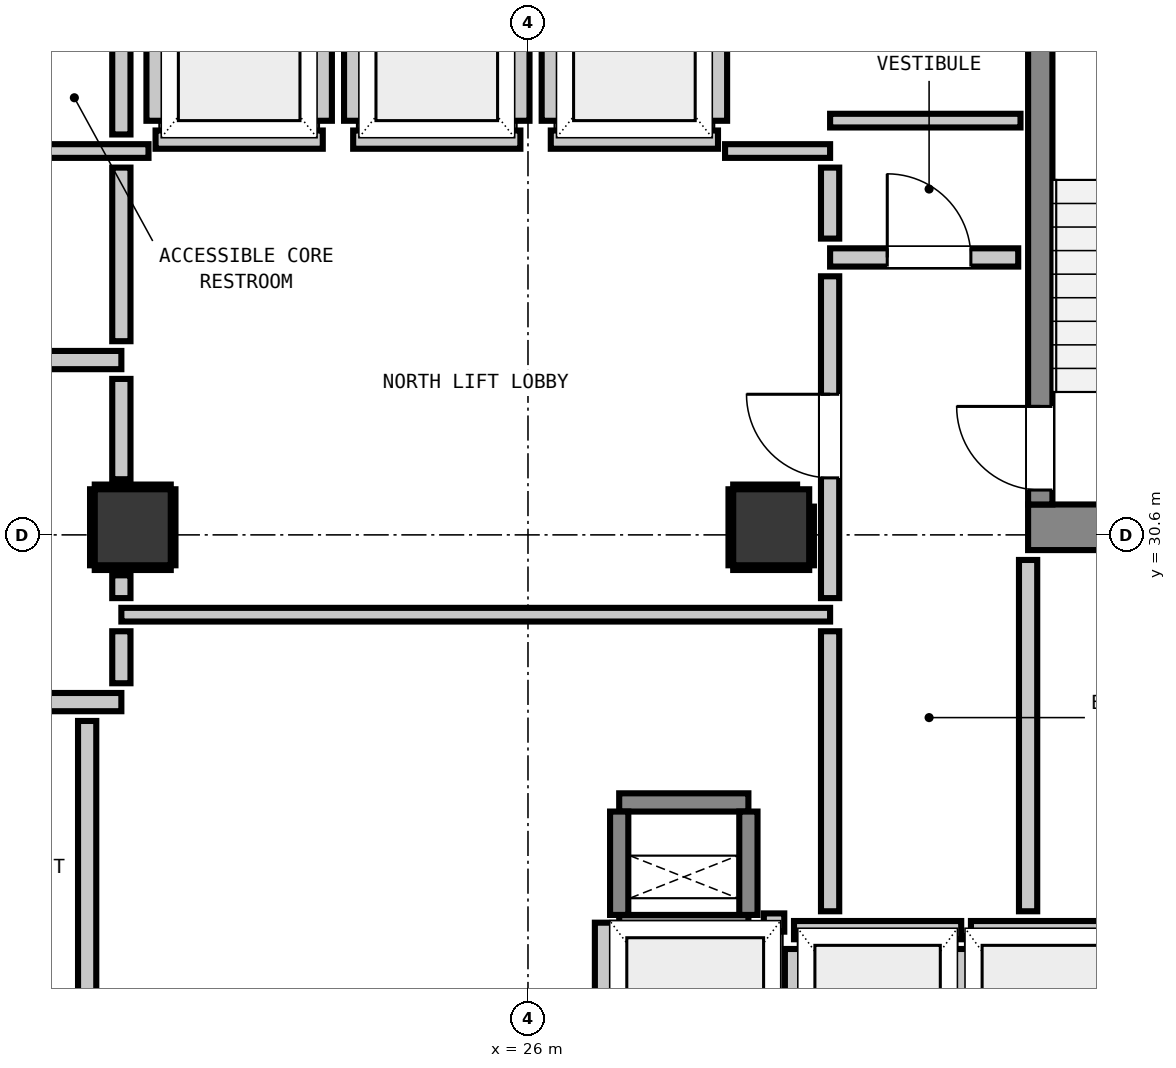
"""IFC4 building model, lengths in metres.
Left out: names, types, materials, properties, quantities, classifications, styles, units other than length and angle.
Written with IfcOpenShell. Run it as: python <this file> out.ifc"""

import sys

from ifc_helpers import new_model, si_unit, direction, frame, frame_2d, origin, origin_2d, place, context, subcontext, project, spatial, rectangle, extrude, element, fill, save


model = new_model("IFC4")
c1 = context("Model", 3, precision=1e-05, world=origin(), true_north=direction((0.0, 1.0)))
c2 = subcontext(c1, "Body", "Model", "MODEL_VIEW")
j1 = project(units=[si_unit("LENGTHUNIT", "METRE"), si_unit("PLANEANGLEUNIT", "RADIAN")], contexts=[c1])
p1 = place(None, origin())
s1 = spatial("IfcSite", under=j1, at=p1, CompositionType="ELEMENT")
p2 = place(p1, origin())
s2 = spatial("IfcBuilding", under=s1, at=p2, CompositionType="ELEMENT")
p3 = place(p2, frame((0.0, 0.0, 41.92)))
s3 = spatial("IfcBuildingStorey", under=s2, at=p3, CompositionType="ELEMENT", Elevation=41.92)
p4 = place(p3, frame((32.58, 30.7, 0.0), z_axis=(0.0, 0.0, 1.0), x_axis=(1.0, 0.0, 0.0)))
e1 = element("IfcWall", 1, at=p4, inside=s3, PredefinedType="SHEAR", context=c2, shape_type="SweptSolid", body=[
    extrude(rectangle(XDim=3.415, YDim=0.6, at=frame_2d((1.708, 0.0))), origin(), (0.0, 0.0, 1.0), 3.32),
])
p5 = place(p3, frame((32.74, 31.0, 0.0), z_axis=(0.0, 0.0, 1.0), x_axis=(0.0, 1.0, 0.0)))
e2 = element("IfcWall", 2, at=p5, inside=s3, PredefinedType="SHEAR", context=c2, shape_type="SweptSolid", body=[
    extrude(rectangle(XDim=7.8, YDim=0.32, at=frame_2d((3.9, 0.0))), origin(), (0.0, 0.0, 1.0), 3.32),
])
p6 = place(p5, frame((0.19, 0.0, 0.0)))
e3 = element("IfcOpeningElement", 3, at=p6, cuts=e2, PredefinedType="OPENING", context=c2, shape_type="SweptSolid", body=[
    extrude(rectangle(XDim=1.1, YDim=2.15, at=frame_2d((0.55, 1.075))), frame((0.0, 0.17, 0.0), z_axis=(0.0, -1.0, 0.0), x_axis=(1.0, 0.0, 0.0)), (0.0, 0.0, 1.0), 0.34),
])
for number, where, z_axis, x_axis in (
    (4, (27.2, 25.48, 0.0), (0.0, 0.0, 1.0), (1.0, 0.0, 0.0)),
    (5, (27.2, 27.08, 0.0), (0.0, 0.0, 1.0), (1.0, 0.0, 0.0)),
):
    element("IfcWall", number, at=place(p3, frame(where, z_axis=z_axis, x_axis=x_axis)), inside=s3, PredefinedType="SHEAR", context=c2, shape_type="SweptSolid", body=[
        extrude(rectangle(XDim=1.7, YDim=0.24, at=frame_2d((0.85, 0.0))), origin(), (0.0, 0.0, 1.0), 3.32),
    ])
for number, where, z_axis, x_axis in (
    (6, (27.2, 25.6, 0.0), (0.0, 0.0, 1.0), (0.0, 1.0, 0.0)),
    (7, (28.9, 25.6, 0.0), (0.0, 0.0, 1.0), (0.0, 1.0, 0.0)),
):
    element("IfcWall", number, at=place(p3, frame(where, z_axis=z_axis, x_axis=x_axis)), inside=s3, PredefinedType="SHEAR", context=c2, shape_type="SweptSolid", body=[
        extrude(rectangle(XDim=1.36, YDim=0.24, at=frame_2d((0.68, 0.0))), origin(), (0.0, 0.0, 1.0), 3.32),
    ])
for number, where, z_axis, x_axis in (
    (8, (20.8, 30.7, 0.0), (0.0, 0.0, 1.0), (1.0, 0.0, 0.0)),
    (9, (29.2, 30.7, 0.0), (0.0, 0.0, 1.0), (1.0, 0.0, 0.0)),
):
    element("IfcColumn", number, at=place(p3, frame(where, z_axis=z_axis, x_axis=x_axis)), inside=s3, PredefinedType="COLUMN", context=c2, shape_type="SweptSolid", body=[
        extrude(rectangle(XDim=1.0, YDim=1.0, at=origin_2d()), origin(), (0.0, 0.0, 1.0), 3.32),
    ])
p7 = place(p3, frame((21.1, 35.8, 0.0), z_axis=(0.0, 0.0, 1.0), x_axis=(1.0, 0.0, 0.0)))
e10 = element("IfcWall", 10, at=p7, inside=s3, PredefinedType="PARTITIONING", context=c2, shape_type="SweptSolid", body=[
    extrude(rectangle(XDim=2.2, YDim=0.24, at=frame_2d((1.1, 0.0))), origin(), (0.0, 0.0, 1.0), 3.06),
])
p8 = place(p3, frame((21.1, 36.048, 0.0), z_axis=(0.0, 0.0, 1.0), x_axis=(0.0, 1.0, 0.0)))
e11 = element("IfcWall", 11, at=p8, inside=s3, PredefinedType="PARTITIONING", context=c2, shape_type="SweptSolid", body=[
    extrude(rectangle(XDim=2.104, YDim=0.24, at=frame_2d((1.052, 0.0))), origin(), (0.0, 0.0, 1.0), 2.295),
])
p9 = place(p3, frame((23.3, 36.048, 0.0), z_axis=(0.0, 0.0, 1.0), x_axis=(0.0, 1.0, 0.0)))
e12 = element("IfcWall", 12, at=p9, inside=s3, PredefinedType="PARTITIONING", context=c2, shape_type="SweptSolid", body=[
    extrude(rectangle(XDim=2.104, YDim=0.24, at=frame_2d((1.052, 0.0))), origin(), (0.0, 0.0, 1.0), 3.06),
])
p10 = place(p3, frame((23.7, 35.8, 0.0), z_axis=(0.0, 0.0, 1.0), x_axis=(1.0, 0.0, 0.0)))
e13 = element("IfcWall", 13, at=p10, inside=s3, PredefinedType="PARTITIONING", context=c2, shape_type="SweptSolid", body=[
    extrude(rectangle(XDim=2.2, YDim=0.24, at=frame_2d((1.1, 0.0))), origin(), (0.0, 0.0, 1.0), 3.06),
])
for number, where, z_axis, x_axis in (
    (14, (23.7, 36.048, 0.0), (0.0, 0.0, 1.0), (0.0, 1.0, 0.0)),
    (15, (25.9, 36.048, 0.0), (0.0, 0.0, 1.0), (0.0, 1.0, 0.0)),
):
    element("IfcWall", number, at=place(p3, frame(where, z_axis=z_axis, x_axis=x_axis)), inside=s3, PredefinedType="PARTITIONING", context=c2, shape_type="SweptSolid", body=[
        extrude(rectangle(XDim=2.104, YDim=0.24, at=frame_2d((1.052, 0.0))), origin(), (0.0, 0.0, 1.0), 3.06),
    ])
p11 = place(p3, frame((26.3, 35.8, 0.0), z_axis=(0.0, 0.0, 1.0), x_axis=(1.0, 0.0, 0.0)))
e16 = element("IfcWall", 16, at=p11, inside=s3, PredefinedType="PARTITIONING", context=c2, shape_type="SweptSolid", body=[
    extrude(rectangle(XDim=2.2, YDim=0.24, at=frame_2d((1.1, 0.0))), origin(), (0.0, 0.0, 1.0), 3.06),
])
for number, where, z_axis, x_axis in (
    (17, (26.3, 36.048, 0.0), (0.0, 0.0, 1.0), (0.0, 1.0, 0.0)),
    (18, (28.5, 36.048, 0.0), (0.0, 0.0, 1.0), (0.0, 1.0, 0.0)),
):
    element("IfcWall", number, at=place(p3, frame(where, z_axis=z_axis, x_axis=x_axis)), inside=s3, PredefinedType="PARTITIONING", context=c2, shape_type="SweptSolid", body=[
        extrude(rectangle(XDim=2.104, YDim=0.24, at=frame_2d((1.052, 0.0))), origin(), (0.0, 0.0, 1.0), 3.06),
    ])
p12 = place(p3, frame((29.5, 25.4, 0.0), z_axis=(0.0, 0.0, 1.0), x_axis=(1.0, 0.0, 0.0)))
e19 = element("IfcWall", 19, at=p12, inside=s3, PredefinedType="PARTITIONING", context=c2, shape_type="SweptSolid", body=[
    extrude(rectangle(XDim=2.2, YDim=0.24, at=frame_2d((1.1, 0.0))), origin(), (0.0, 0.0, 1.0), 3.06),
])
p13 = place(p3, frame((29.5, 22.632, 0.0), z_axis=(0.0, 0.0, 1.0), x_axis=(0.0, 1.0, 0.0)))
e20 = element("IfcWall", 20, at=p13, inside=s3, PredefinedType="PARTITIONING", context=c2, shape_type="SweptSolid", body=[
    extrude(rectangle(XDim=2.52, YDim=0.24, at=frame_2d((1.26, 0.0))), origin(), (0.0, 0.0, 1.0), 2.295),
])
p14 = place(p3, frame((31.7, 22.73, 0.0), z_axis=(0.0, 0.0, 1.0), x_axis=(0.0, 1.0, 0.0)))
e21 = element("IfcWall", 21, at=p14, inside=s3, PredefinedType="PARTITIONING", context=c2, shape_type="SweptSolid", body=[
    extrude(rectangle(XDim=2.422, YDim=0.24, at=frame_2d((1.211, 0.0))), origin(), (0.0, 0.0, 1.0), 3.06),
])
p15 = place(p3, frame((31.828, 25.4, 0.0), z_axis=(0.0, 0.0, 1.0), x_axis=(1.0, 0.0, 0.0)))
e22 = element("IfcWall", 22, at=p15, inside=s3, PredefinedType="PARTITIONING", context=c2, shape_type="SweptSolid", body=[
    extrude(rectangle(XDim=2.072, YDim=0.24, at=frame_2d((1.036, 0.0))), origin(), (0.0, 0.0, 1.0), 3.06),
])
p16 = place(p3, frame((29.103, 25.5, 0.0), z_axis=(0.0, 0.0, 1.0), x_axis=(1.0, 0.0, 0.0)))
e23 = element("IfcWall", 23, at=p16, inside=s3, PredefinedType="PARTITIONING", context=c2, shape_type="SweptSolid", body=[
    extrude(rectangle(XDim=0.269, YDim=0.24, at=frame_2d((0.135, 0.0))), origin(), (0.0, 0.0, 1.0), 3.06),
])
p17 = place(p3, frame((27.0, 22.73, 0.0), z_axis=(0.0, 0.0, 1.0), x_axis=(0.0, 1.0, 0.0)))
e24 = element("IfcWall", 24, at=p17, inside=s3, PredefinedType="PARTITIONING", context=c2, shape_type="SweptSolid", body=[
    extrude(rectangle(XDim=2.768, YDim=0.24, at=frame_2d((1.384, 0.0))), origin(), (0.0, 0.0, 1.0), 3.06),
])
p18 = place(p3, frame((17.45, 28.4, 0.0), z_axis=(0.0, 0.0, 1.0), x_axis=(1.0, 0.0, 0.0)))
e25 = element("IfcWall", 25, at=p18, inside=s3, PredefinedType="PARTITIONING", context=c2, shape_type="SweptSolid", body=[
    extrude(rectangle(XDim=3.2, YDim=0.24, at=frame_2d((1.6, 0.0))), origin(), (0.0, 0.0, 1.0), 3.06),
])
p19 = place(p18, frame((0.784, 0.0, 0.0)))
e26 = element("IfcOpeningElement", 26, at=p19, cuts=e25, PredefinedType="OPENING", context=c2, shape_type="SweptSolid", body=[
    extrude(rectangle(XDim=1.1, YDim=2.15, at=frame_2d((0.55, 1.075))), frame((0.0, 0.13, 0.0), z_axis=(0.0, -1.0, 0.0), x_axis=(1.0, 0.0, 0.0)), (0.0, 0.0, 1.0), 0.26),
])
p20 = place(p3, frame((17.45, 32.9, 0.0), z_axis=(0.0, 0.0, 1.0), x_axis=(1.0, 0.0, 0.0)))
e27 = element("IfcWall", 27, at=p20, inside=s3, PredefinedType="PARTITIONING", context=c2, shape_type="SweptSolid", body=[
    extrude(rectangle(XDim=3.2, YDim=0.24, at=frame_2d((1.6, 0.0))), origin(), (0.0, 0.0, 1.0), 3.06),
])
p21 = place(p20, frame((0.159, 0.0, 0.0)))
e28 = element("IfcOpeningElement", 28, at=p21, cuts=e27, PredefinedType="OPENING", context=c2, shape_type="SweptSolid", body=[
    extrude(rectangle(XDim=1.1, YDim=2.15, at=frame_2d((0.55, 1.075))), frame((0.0, 0.13, 0.0), z_axis=(0.0, -1.0, 0.0), x_axis=(1.0, 0.0, 0.0)), (0.0, 0.0, 1.0), 0.26),
])
p22 = place(p3, frame((29.975, 34.25, 0.0), z_axis=(0.0, 0.0, 1.0), x_axis=(1.0, 0.0, 0.0)))
e29 = element("IfcWall", 29, at=p22, inside=s3, PredefinedType="PARTITIONING", context=c2, shape_type="SweptSolid", body=[
    extrude(rectangle(XDim=2.475, YDim=0.24, at=frame_2d((1.237, 0.0))), origin(), (0.0, 0.0, 1.0), 3.06),
])
p23 = place(p22, frame((0.752, 0.0, 0.0)))
e30 = element("IfcOpeningElement", 30, at=p23, cuts=e29, PredefinedType="OPENING", context=c2, shape_type="SweptSolid", body=[
    extrude(rectangle(XDim=1.1, YDim=2.15, at=frame_2d((0.55, 1.075))), frame((0.0, 0.13, 0.0), z_axis=(0.0, -1.0, 0.0), x_axis=(1.0, 0.0, 0.0)), (0.0, 0.0, 1.0), 0.26),
])
p24 = place(p3, frame((20.65, 29.55, 0.0), z_axis=(0.0, 0.0, 1.0), x_axis=(1.0, 0.0, 0.0)))
e31 = element("IfcWall", 31, at=p24, inside=s3, PredefinedType="PARTITIONING", context=c2, shape_type="SweptSolid", body=[
    extrude(rectangle(XDim=9.325, YDim=0.18, at=frame_2d((4.663, 0.0))), origin(), (0.0, 0.0, 1.0), 3.06),
])
p25 = place(p3, frame((18.95, 35.65, 0.0), z_axis=(0.0, 0.0, 1.0), x_axis=(1.0, 0.0, 0.0)))
e32 = element("IfcWall", 32, at=p25, inside=s3, PredefinedType="PARTITIONING", context=c2, shape_type="SweptSolid", body=[
    extrude(rectangle(XDim=2.057, YDim=0.18, at=frame_2d((1.029, 0.0))), origin(), (0.0, 0.0, 1.0), 3.06),
])
p26 = place(p3, frame((28.593, 35.65, 0.0), z_axis=(0.0, 0.0, 1.0), x_axis=(1.0, 0.0, 0.0)))
e33 = element("IfcWall", 33, at=p26, inside=s3, PredefinedType="PARTITIONING", context=c2, shape_type="SweptSolid", body=[
    extrude(rectangle(XDim=1.382, YDim=0.18, at=frame_2d((0.691, 0.0))), origin(), (0.0, 0.0, 1.0), 3.06),
])
p27 = place(p3, frame((29.975, 36.05, 0.0), z_axis=(0.0, 0.0, 1.0), x_axis=(1.0, 0.0, 0.0)))
e34 = element("IfcWall", 34, at=p27, inside=s3, PredefinedType="PARTITIONING", context=c2, shape_type="SweptSolid", body=[
    extrude(rectangle(XDim=2.505, YDim=0.18, at=frame_2d((1.252, 0.0))), origin(), (0.0, 0.0, 1.0), 3.06),
])
p28 = place(p3, frame((20.2, 22.586, 0.0), z_axis=(0.0, 0.0, 1.0), x_axis=(0.0, 1.0, 0.0)))
e35 = element("IfcWall", 35, at=p28, inside=s3, PredefinedType="PARTITIONING", context=c2, shape_type="SweptSolid", body=[
    extrude(rectangle(XDim=5.566, YDim=0.24, at=frame_2d((2.783, 0.0))), origin(), (0.0, 0.0, 1.0), 3.06),
])
p29 = place(p3, frame((20.65, 28.648, 0.0), z_axis=(0.0, 0.0, 1.0), x_axis=(0.0, 1.0, 0.0)))
e36 = element("IfcWall", 36, at=p29, inside=s3, PredefinedType="PARTITIONING", context=c2, shape_type="SweptSolid", body=[
    extrude(rectangle(XDim=0.684, YDim=0.24, at=frame_2d((0.342, 0.0))), origin(), (0.0, 0.0, 1.0), 2.295),
])
p30 = place(p3, frame((20.65, 29.768, 0.0), z_axis=(0.0, 0.0, 1.0), x_axis=(0.0, 1.0, 0.0)))
e37 = element("IfcWall", 37, at=p30, inside=s3, PredefinedType="PARTITIONING", context=c2, shape_type="SweptSolid", body=[
    extrude(rectangle(XDim=0.3, YDim=0.24, at=frame_2d((0.15, 0.0))), origin(), (0.0, 0.0, 1.0), 2.295),
])
p31 = place(p3, frame((20.65, 31.332, 0.0), z_axis=(0.0, 0.0, 1.0), x_axis=(0.0, 1.0, 0.0)))
e38 = element("IfcWall", 38, at=p31, inside=s3, PredefinedType="PARTITIONING", context=c2, shape_type="SweptSolid", body=[
    extrude(rectangle(XDim=1.32, YDim=0.24, at=frame_2d((0.66, 0.0))), origin(), (0.0, 0.0, 1.0), 2.295),
])
p32 = place(p3, frame((20.65, 33.148, 0.0), z_axis=(0.0, 0.0, 1.0), x_axis=(0.0, 1.0, 0.0)))
e39 = element("IfcWall", 39, at=p32, inside=s3, PredefinedType="PARTITIONING", context=c2, shape_type="SweptSolid", body=[
    extrude(rectangle(XDim=2.284, YDim=0.24, at=frame_2d((1.142, 0.0))), origin(), (0.0, 0.0, 1.0), 2.295),
])
p33 = place(p3, frame((20.65, 35.868, 0.0), z_axis=(0.0, 0.0, 1.0), x_axis=(0.0, 1.0, 0.0)))
e40 = element("IfcWall", 40, at=p33, inside=s3, PredefinedType="PARTITIONING", context=c2, shape_type="SweptSolid", body=[
    extrude(rectangle(XDim=2.684, YDim=0.24, at=frame_2d((1.342, 0.0))), origin(), (0.0, 0.0, 1.0), 2.295),
])
p34 = place(p3, frame((29.975, 25.648, 0.0), z_axis=(0.0, 0.0, 1.0), x_axis=(0.0, 1.0, 0.0)))
e41 = element("IfcWall", 41, at=p34, inside=s3, PredefinedType="PARTITIONING", context=c2, shape_type="SweptSolid", body=[
    extrude(rectangle(XDim=3.684, YDim=0.24, at=frame_2d((1.842, 0.0))), origin(), (0.0, 0.0, 1.0), 3.06),
])
p35 = place(p3, frame((29.975, 29.768, 0.0), z_axis=(0.0, 0.0, 1.0), x_axis=(0.0, 1.0, 0.0)))
e42 = element("IfcWall", 42, at=p35, inside=s3, PredefinedType="PARTITIONING", context=c2, shape_type="SweptSolid", body=[
    extrude(rectangle(XDim=4.234, YDim=0.24, at=frame_2d((2.117, 0.0))), origin(), (0.0, 0.0, 1.0), 3.06),
])
p36 = place(p35, frame((1.582, 0.0, 0.0)))
e43 = element("IfcOpeningElement", 43, at=p36, cuts=e42, PredefinedType="OPENING", context=c2, shape_type="SweptSolid", body=[
    extrude(rectangle(XDim=1.1, YDim=2.15, at=frame_2d((0.55, 1.075))), frame((0.0, 0.13, 0.0), z_axis=(0.0, -1.0, 0.0), x_axis=(1.0, 0.0, 0.0)), (0.0, 0.0, 1.0), 0.26),
])
p37 = place(p3, frame((29.975, 34.498, 0.0), z_axis=(0.0, 0.0, 1.0), x_axis=(0.0, 1.0, 0.0)))
e44 = element("IfcWall", 44, at=p37, inside=s3, PredefinedType="PARTITIONING", context=c2, shape_type="SweptSolid", body=[
    extrude(rectangle(XDim=0.934, YDim=0.24, at=frame_2d((0.467, 0.0))), origin(), (0.0, 0.0, 1.0), 3.06),
])
p38 = place(p3, frame((32.58, 25.648, 0.0), z_axis=(0.0, 0.0, 1.0), x_axis=(0.0, 1.0, 0.0)))
e45 = element("IfcWall", 45, at=p38, inside=s3, PredefinedType="PARTITIONING", context=c2, shape_type="SweptSolid", body=[
    extrude(rectangle(XDim=4.622, YDim=0.24, at=frame_2d((2.311, 0.0))), origin(), (0.0, 0.0, 1.0), 3.06),
])
for number, where, z_axis, x_axis in (
    (46, (20.3, 30.168, 0.0), (0.0, 0.0, 1.0), (1.0, 0.0, 0.0)),
    (47, (20.3, 31.232, 0.0), (0.0, 0.0, 1.0), (1.0, 0.0, 0.0)),
    (48, (20.268, 30.2, 0.0), (0.0, 0.0, 1.0), (0.0, 1.0, 0.0)),
    (49, (21.332, 30.2, 0.0), (0.0, 0.0, 1.0), (0.0, 1.0, 0.0)),
    (50, (28.7, 30.168, 0.0), (0.0, 0.0, 1.0), (1.0, 0.0, 0.0)),
):
    element("IfcWall", number, at=place(p3, frame(where, z_axis=z_axis, x_axis=x_axis)), inside=s3, PredefinedType="PARTITIONING", context=c2, shape_type="SweptSolid", body=[
        extrude(rectangle(XDim=1.0, YDim=0.06, at=frame_2d((0.5, 0.0))), origin(), (0.0, 0.0, 1.0), 1.45),
    ])
p39 = place(p3, frame((28.7, 31.232, 0.0), z_axis=(0.0, 0.0, 1.0), x_axis=(1.0, 0.0, 0.0)))
e51 = element("IfcWall", 51, at=p39, inside=s3, PredefinedType="PARTITIONING", context=c2, shape_type="SweptSolid", body=[
    extrude(rectangle(XDim=0.841, YDim=0.06, at=frame_2d((0.42, 0.0))), origin(), (0.0, 0.0, 1.0), 1.45),
])
p40 = place(p3, frame((28.668, 30.2, 0.0), z_axis=(0.0, 0.0, 1.0), x_axis=(0.0, 1.0, 0.0)))
e52 = element("IfcWall", 52, at=p40, inside=s3, PredefinedType="PARTITIONING", context=c2, shape_type="SweptSolid", body=[
    extrude(rectangle(XDim=1.0, YDim=0.06, at=frame_2d((0.5, 0.0))), origin(), (0.0, 0.0, 1.0), 1.45),
])
p41 = place(p3, frame((29.732, 30.2, 0.0), z_axis=(0.0, 0.0, 1.0), x_axis=(0.0, 1.0, 0.0)))
e53 = element("IfcWall", 53, at=p41, inside=s3, PredefinedType="PARTITIONING", context=c2, shape_type="SweptSolid", body=[
    extrude(rectangle(XDim=0.772, YDim=0.06, at=frame_2d((0.386, 0.0))), origin(), (0.0, 0.0, 1.0), 1.45),
])
p42 = place(p6, origin())
e54 = element("IfcDoor", 54, at=p42, inside=s3, OperationType="SINGLE_SWING_RIGHT", PredefinedType="DOOR", context=c2, shape_type="SweptSolid", body=[
    extrude(rectangle(XDim=1.1, YDim=2.15, at=frame_2d((0.55, 1.075))), frame((0.0, 0.025, 0.0), z_axis=(0.0, -1.0, 0.0), x_axis=(1.0, 0.0, 0.0)), (0.0, 0.0, 1.0), 0.05),
])
fill(e3, e54)
p43 = place(p36, origin())
e55 = element("IfcDoor", 55, at=p43, inside=s3, OperationType="SINGLE_SWING_RIGHT", PredefinedType="DOOR", context=c2, shape_type="SweptSolid", body=[
    extrude(rectangle(XDim=1.1, YDim=2.15, at=frame_2d((0.55, 1.075))), frame((0.0, 0.025, 0.0), z_axis=(0.0, -1.0, 0.0), x_axis=(1.0, 0.0, 0.0)), (0.0, 0.0, 1.0), 0.05),
])
fill(e43, e55)
p44 = place(p23, origin())
e56 = element("IfcDoor", 56, at=p44, inside=s3, OperationType="SINGLE_SWING_LEFT", PredefinedType="DOOR", context=c2, shape_type="SweptSolid", body=[
    extrude(rectangle(XDim=1.1, YDim=2.15, at=frame_2d((0.55, 1.075))), frame((0.0, 0.025, 0.0), z_axis=(0.0, -1.0, 0.0), x_axis=(1.0, 0.0, 0.0)), (0.0, 0.0, 1.0), 0.05),
])
fill(e30, e56)
save(model, sys.argv[1])
